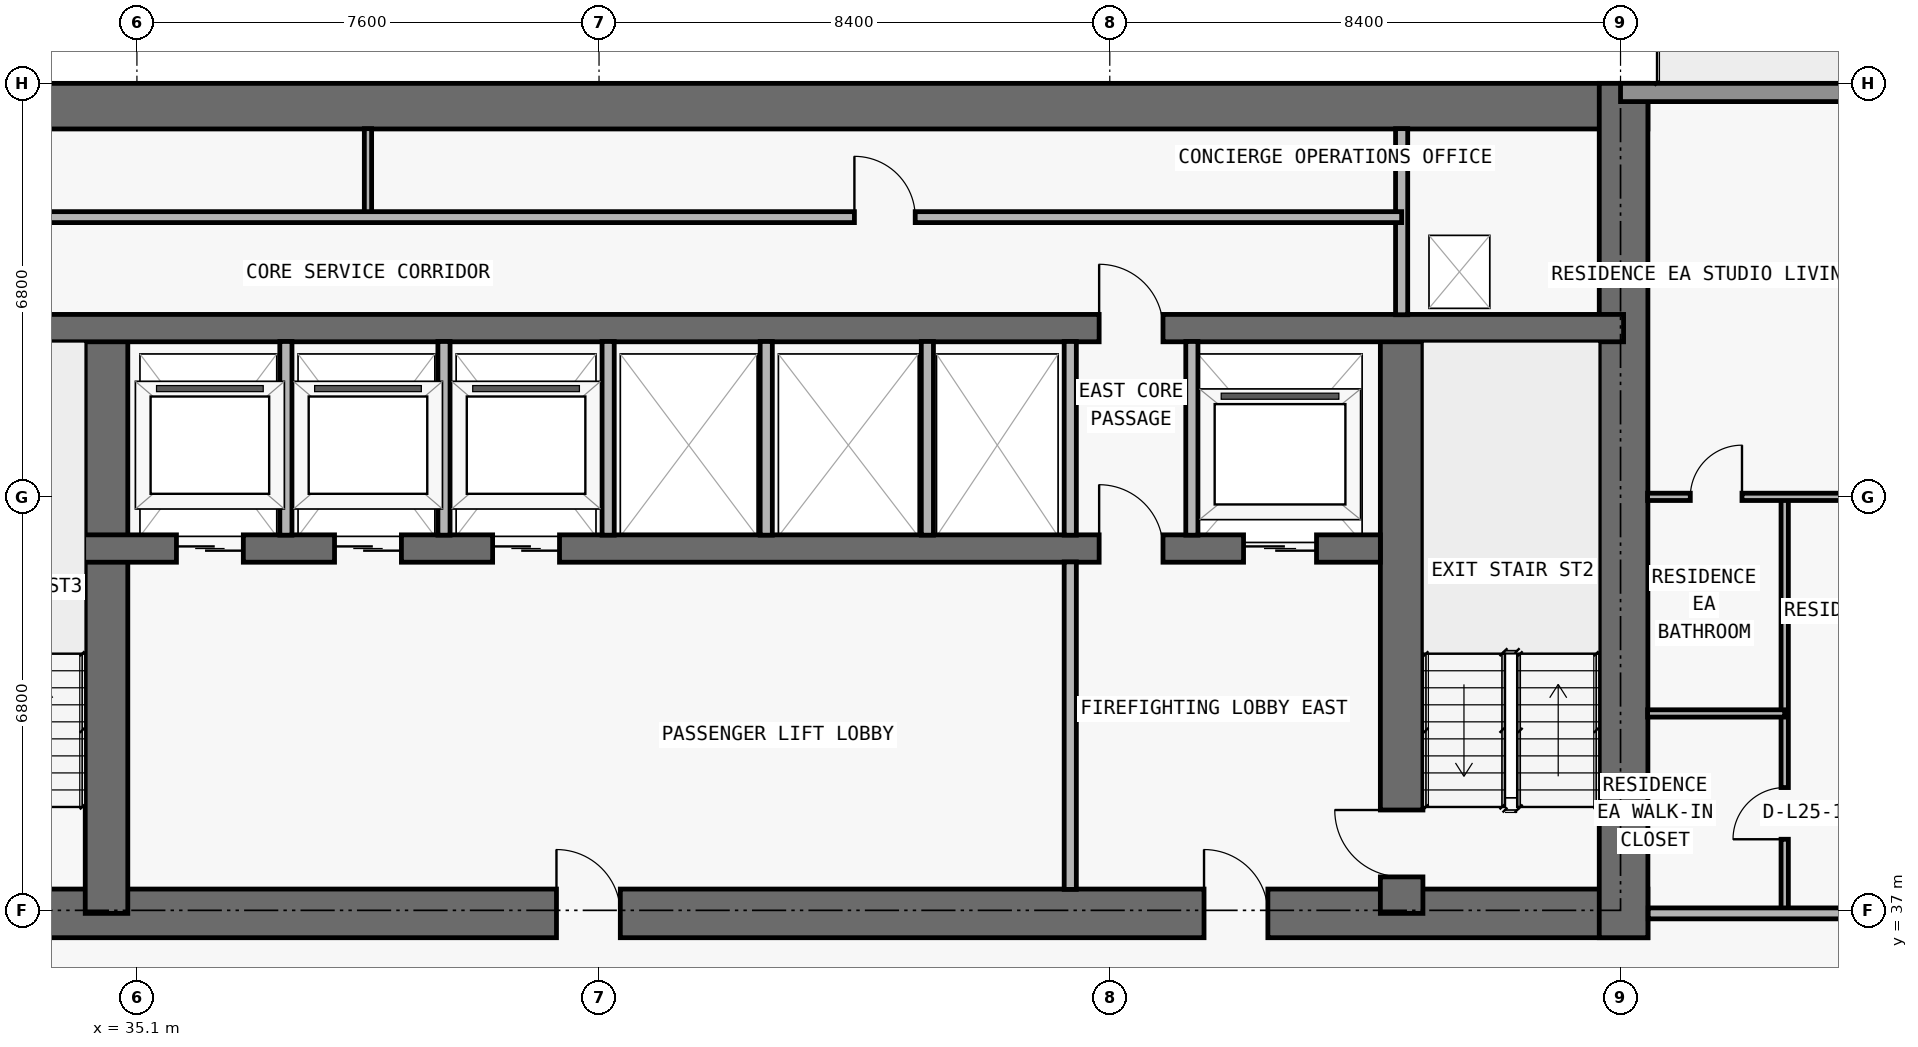
"""IFC4 building model, lengths in metres.
Left out: names, types, materials, properties, quantities, classifications, styles, units other than length and angle.
Written with IfcOpenShell. Run it as: python <this file> out.ifc"""

import sys

from ifc_helpers import new_model, si_unit, direction, frame, frame_2d, origin, place, context, subcontext, project, spatial, rectangle, extrude, element, fill, save


model = new_model("IFC4")
c1 = context("Model", 3, precision=1e-05, world=origin(), true_north=direction((0.0, 1.0)))
c2 = subcontext(c1, "Body", "Model", "MODEL_VIEW")
j1 = project(units=[si_unit("LENGTHUNIT", "METRE"), si_unit("PLANEANGLEUNIT", "RADIAN")], contexts=[c1])
p1 = place(None, origin())
s1 = spatial("IfcSite", under=j1, at=p1, CompositionType="ELEMENT")
p2 = place(p1, origin())
s2 = spatial("IfcBuilding", under=s1, at=p2, CompositionType="ELEMENT")
p3 = place(p2, frame((0.0, 0.0, 94.5)))
s3 = spatial("IfcBuildingStorey", under=s2, at=p3, CompositionType="ELEMENT", Elevation=94.5)
p4 = place(p3, frame((17.85, 36.95, 0.0), z_axis=(0.0, 0.0, 1.0), x_axis=(1.0, 0.0, 0.0)))
e1 = element("IfcWall", 1, at=p4, inside=s3, PredefinedType="SHEAR", context=c2, shape_type="SweptSolid", body=[
    extrude(rectangle(XDim=42.1, YDim=0.8, at=frame_2d((21.05, 0.0))), origin(), (0.0, 0.0, 1.0), 3.0),
])
p5 = place(p4, frame((14.45, 0.0, 0.0)))
e2 = element("IfcOpeningElement", 2, at=p5, cuts=e1, PredefinedType="OPENING", context=c2, shape_type="SweptSolid", body=[
    extrude(rectangle(XDim=1.1, YDim=2.15, at=frame_2d((0.55, 1.075))), frame((0.0, 0.41, 0.0), z_axis=(0.0, -1.0, 0.0), x_axis=(1.0, 0.0, 0.0)), (0.0, 0.0, 1.0), 0.82),
])
p6 = place(p4, frame((6.3, 0.0, 0.0)))
e3 = element("IfcOpeningElement", 3, at=p6, cuts=e1, PredefinedType="OPENING", context=c2, shape_type="SweptSolid", body=[
    extrude(rectangle(XDim=1.05, YDim=2.15, at=frame_2d((0.525, 1.075))), frame((0.0, 0.41, 0.0), z_axis=(0.0, -1.0, 0.0), x_axis=(1.0, 0.0, 0.0)), (0.0, 0.0, 1.0), 0.82),
])
p7 = place(p4, frame((34.8, 0.0, 0.0)))
e4 = element("IfcOpeningElement", 4, at=p7, cuts=e1, PredefinedType="OPENING", context=c2, shape_type="SweptSolid", body=[
    extrude(rectangle(XDim=1.05, YDim=2.15, at=frame_2d((0.525, 1.075))), frame((0.0, 0.41, 0.0), z_axis=(0.0, -1.0, 0.0), x_axis=(1.0, 0.0, 0.0)), (0.0, 0.0, 1.0), 0.82),
])
p8 = place(p4, frame((10.913, 0.0, 0.0)))
e5 = element("IfcOpeningElement", 5, at=p8, cuts=e1, PredefinedType="OPENING", context=c2, shape_type="SweptSolid", body=[
    extrude(rectangle(XDim=1.05, YDim=2.15, at=frame_2d((0.525, 1.075))), frame((0.0, 0.41, 0.0), z_axis=(0.0, -1.0, 0.0), x_axis=(1.0, 0.0, 0.0)), (0.0, 0.0, 1.0), 0.82),
])
p9 = place(p4, frame((24.15, 0.0, 0.0)))
e6 = element("IfcOpeningElement", 6, at=p9, cuts=e1, PredefinedType="OPENING", context=c2, shape_type="SweptSolid", body=[
    extrude(rectangle(XDim=1.05, YDim=2.15, at=frame_2d((0.525, 1.075))), frame((0.0, 0.41, 0.0), z_axis=(0.0, -1.0, 0.0), x_axis=(1.0, 0.0, 0.0)), (0.0, 0.0, 1.0), 0.82),
])
p10 = place(p3, frame((17.85, 50.225, 0.0), z_axis=(0.0, 0.0, 1.0), x_axis=(1.0, 0.0, 0.0)))
e7 = element("IfcWall", 7, at=p10, inside=s3, PredefinedType="SHEAR", context=c2, shape_type="SweptSolid", body=[
    extrude(rectangle(XDim=42.1, YDim=0.75, at=frame_2d((21.05, 0.0))), origin(), (0.0, 0.0, 1.0), 3.0),
])
p11 = place(p3, frame((59.55, 36.55, 0.0), z_axis=(0.0, 0.0, 1.0), x_axis=(0.0, 1.0, 0.0)))
e8 = element("IfcWall", 8, at=p11, inside=s3, PredefinedType="SHEAR", context=c2, shape_type="SweptSolid", body=[
    extrude(rectangle(XDim=14.05, YDim=0.8, at=frame_2d((7.025, 0.0))), origin(), (0.0, 0.0, 1.0), 3.0),
])
p12 = place(p3, frame((55.9, 36.95, 0.0), z_axis=(0.0, 0.0, 1.0), x_axis=(0.0, 1.0, 0.0)))
e9 = element("IfcWall", 9, at=p12, inside=s3, PredefinedType="SHEAR", context=c2, shape_type="SweptSolid", body=[
    extrude(rectangle(XDim=9.625, YDim=0.7, at=frame_2d((4.812, 0.0))), origin(), (0.0, 0.0, 1.0), 3.0),
])
p13 = place(p12, frame((0.6, 0.0, 0.0)))
e10 = element("IfcOpeningElement", 10, at=p13, cuts=e9, PredefinedType="OPENING", context=c2, shape_type="SweptSolid", body=[
    extrude(rectangle(XDim=1.1, YDim=2.15, at=frame_2d((0.55, 1.075))), frame((0.0, 0.36, 0.0), z_axis=(0.0, -1.0, 0.0), x_axis=(1.0, 0.0, 0.0)), (0.0, 0.0, 1.0), 0.72),
])
p14 = place(p3, frame((34.6, 36.95, 0.0), z_axis=(0.0, 0.0, 1.0), x_axis=(0.0, 1.0, 0.0)))
e11 = element("IfcWall", 11, at=p14, inside=s3, PredefinedType="SHEAR", context=c2, shape_type="SweptSolid", body=[
    extrude(rectangle(XDim=9.625, YDim=0.7, at=frame_2d((4.812, 0.0))), origin(), (0.0, 0.0, 1.0), 3.0),
])
p15 = place(p3, frame((22.25, 42.95, 0.0), z_axis=(0.0, 0.0, 1.0), x_axis=(1.0, 0.0, 0.0)))
e12 = element("IfcWall", 12, at=p15, inside=s3, PredefinedType="SHEAR", context=c2, shape_type="SweptSolid", body=[
    extrude(rectangle(XDim=33.3, YDim=0.45, at=frame_2d((16.65, 0.0))), origin(), (0.0, 0.0, 1.0), 3.0),
])
p16 = place(p15, frame((1.05, 0.0, 0.0)))
e13 = element("IfcOpeningElement", 13, at=p16, cuts=e12, PredefinedType="OPENING", context=c2, shape_type="SweptSolid", body=[
    extrude(rectangle(XDim=1.2, YDim=2.2, at=frame_2d((0.6, 1.1))), frame((0.0, 0.235, 0.0), z_axis=(0.0, -1.0, 0.0), x_axis=(1.0, 0.0, 0.0)), (0.0, 0.0, 1.0), 0.47),
])
p17 = place(p15, frame((31.05, 0.0, 0.0)))
e14 = element("IfcOpeningElement", 14, at=p17, cuts=e12, PredefinedType="OPENING", context=c2, shape_type="SweptSolid", body=[
    extrude(rectangle(XDim=1.2, YDim=2.2, at=frame_2d((0.6, 1.1))), frame((0.0, 0.235, 0.0), z_axis=(0.0, -1.0, 0.0), x_axis=(1.0, 0.0, 0.0)), (0.0, 0.0, 1.0), 0.47),
])
p18 = place(p15, frame((13.5, 0.0, 0.0)))
e15 = element("IfcOpeningElement", 15, at=p18, cuts=e12, PredefinedType="OPENING", context=c2, shape_type="SweptSolid", body=[
    extrude(rectangle(XDim=1.1, YDim=2.2, at=frame_2d((0.55, 1.1))), frame((0.0, 0.235, 0.0), z_axis=(0.0, -1.0, 0.0), x_axis=(1.0, 0.0, 0.0)), (0.0, 0.0, 1.0), 0.47),
])
p19 = place(p15, frame((16.1, 0.0, 0.0)))
e16 = element("IfcOpeningElement", 16, at=p19, cuts=e12, PredefinedType="OPENING", context=c2, shape_type="SweptSolid", body=[
    extrude(rectangle(XDim=1.1, YDim=2.2, at=frame_2d((0.55, 1.1))), frame((0.0, 0.235, 0.0), z_axis=(0.0, -1.0, 0.0), x_axis=(1.0, 0.0, 0.0)), (0.0, 0.0, 1.0), 0.47),
])
p20 = place(p15, frame((18.7, 0.0, 0.0)))
e17 = element("IfcOpeningElement", 17, at=p20, cuts=e12, PredefinedType="OPENING", context=c2, shape_type="SweptSolid", body=[
    extrude(rectangle(XDim=1.1, YDim=2.2, at=frame_2d((0.55, 1.1))), frame((0.0, 0.235, 0.0), z_axis=(0.0, -1.0, 0.0), x_axis=(1.0, 0.0, 0.0)), (0.0, 0.0, 1.0), 0.47),
])
p21 = place(p15, frame((3.625, 0.0, 0.0)))
e18 = element("IfcOpeningElement", 18, at=p21, cuts=e12, PredefinedType="OPENING", context=c2, shape_type="SweptSolid", body=[
    extrude(rectangle(XDim=1.05, YDim=2.15, at=frame_2d((0.525, 1.075))), frame((0.0, 0.235, 0.0), z_axis=(0.0, -1.0, 0.0), x_axis=(1.0, 0.0, 0.0)), (0.0, 0.0, 1.0), 0.47),
])
p22 = place(p15, frame((28.675, 0.0, 0.0)))
e19 = element("IfcOpeningElement", 19, at=p22, cuts=e12, PredefinedType="OPENING", context=c2, shape_type="SweptSolid", body=[
    extrude(rectangle(XDim=1.05, YDim=2.15, at=frame_2d((0.525, 1.075))), frame((0.0, 0.235, 0.0), z_axis=(0.0, -1.0, 0.0), x_axis=(1.0, 0.0, 0.0)), (0.0, 0.0, 1.0), 0.47),
])
p23 = place(p3, frame((18.25, 46.575, 0.0), z_axis=(0.0, 0.0, 1.0), x_axis=(1.0, 0.0, 0.0)))
e20 = element("IfcWall", 20, at=p23, inside=s3, PredefinedType="SHEAR", context=c2, shape_type="SweptSolid", body=[
    extrude(rectangle(XDim=41.3, YDim=0.45, at=frame_2d((20.65, 0.0))), origin(), (0.0, 0.0, 1.0), 3.0),
])
p24 = place(p23, frame((7.625, 0.0, 0.0)))
e21 = element("IfcOpeningElement", 21, at=p24, cuts=e20, PredefinedType="OPENING", context=c2, shape_type="SweptSolid", body=[
    extrude(rectangle(XDim=1.05, YDim=2.15, at=frame_2d((0.525, 1.075))), frame((0.0, 0.235, 0.0), z_axis=(0.0, -1.0, 0.0), x_axis=(1.0, 0.0, 0.0)), (0.0, 0.0, 1.0), 0.47),
])
p25 = place(p23, frame((32.675, 0.0, 0.0)))
e22 = element("IfcOpeningElement", 22, at=p25, cuts=e20, PredefinedType="OPENING", context=c2, shape_type="SweptSolid", body=[
    extrude(rectangle(XDim=1.05, YDim=2.15, at=frame_2d((0.525, 1.075))), frame((0.0, 0.235, 0.0), z_axis=(0.0, -1.0, 0.0), x_axis=(1.0, 0.0, 0.0)), (0.0, 0.0, 1.0), 0.47),
])
p26 = place(p3, frame((59.5, 50.45, 0.0), z_axis=(0.0, 0.0, 1.0), x_axis=(1.0, 0.0, 0.0)))
e23 = element("IfcWall", 23, at=p26, inside=s3, PredefinedType="STANDARD", context=c2, shape_type="SweptSolid", body=[
    extrude(rectangle(XDim=10.6, YDim=0.3, at=frame_2d((5.3, 0.0))), origin(), (0.0, 0.0, 1.0), 3.0),
])
p27 = place(p26, frame((4.3, 0.0, 0.0)))
e24 = element("IfcOpeningElement", 24, at=p27, cuts=e23, PredefinedType="OPENING", context=c2, shape_type="SweptSolid", body=[
    extrude(rectangle(XDim=2.0, YDim=2.3, at=frame_2d((1.0, 1.15))), frame((0.0, 0.16, 0.0), z_axis=(0.0, -1.0, 0.0), x_axis=(1.0, 0.0, 0.0)), (0.0, 0.0, 1.0), 0.32),
])
p28 = place(p3, frame((37.55, 43.17, 0.0), z_axis=(0.0, 0.0, 1.0), x_axis=(0.0, 1.0, 0.0)))
e25 = element("IfcWall", 25, at=p28, inside=s3, PredefinedType="PARTITIONING", context=c2, shape_type="SweptSolid", body=[
    extrude(rectangle(XDim=3.185, YDim=0.2, at=frame_2d((1.593, 0.0))), origin(), (0.0, 0.0, 1.0), 3.0),
])
p29 = place(p3, frame((38.9, 48.4, 0.0), z_axis=(0.0, 0.0, 1.0), x_axis=(0.0, 1.0, 0.0)))
e26 = element("IfcWall", 26, at=p29, inside=s3, PredefinedType="PARTITIONING", context=c2, shape_type="SweptSolid", body=[
    extrude(rectangle(XDim=1.455, YDim=0.12, at=frame_2d((0.728, 0.0))), origin(), (0.0, 0.0, 1.0), 3.0),
])
for number, where, z_axis, x_axis in (
    (27, (40.15, 43.17, 0.0), (0.0, 0.0, 1.0), (0.0, 1.0, 0.0)),
    (28, (42.85, 43.17, 0.0), (0.0, 0.0, 1.0), (0.0, 1.0, 0.0)),
    (29, (45.45, 43.17, 0.0), (0.0, 0.0, 1.0), (0.0, 1.0, 0.0)),
    (30, (48.1, 43.17, 0.0), (0.0, 0.0, 1.0), (0.0, 1.0, 0.0)),
):
    element("IfcWall", number, at=place(p3, frame(where, z_axis=z_axis, x_axis=x_axis)), inside=s3, PredefinedType="PARTITIONING", context=c2, shape_type="SweptSolid", body=[
        extrude(rectangle(XDim=3.185, YDim=0.2, at=frame_2d((1.593, 0.0))), origin(), (0.0, 0.0, 1.0), 3.0),
    ])
p30 = place(p3, frame((50.45, 37.345, 0.0), z_axis=(0.0, 0.0, 1.0), x_axis=(0.0, 1.0, 0.0)))
e31 = element("IfcWall", 31, at=p30, inside=s3, PredefinedType="PARTITIONING", context=c2, shape_type="SweptSolid", body=[
    extrude(rectangle(XDim=5.385, YDim=0.2, at=frame_2d((2.692, 0.0))), origin(), (0.0, 0.0, 1.0), 3.0),
])
for number, where, z_axis, x_axis in (
    (32, (50.45, 43.17, 0.0), (0.0, 0.0, 1.0), (0.0, 1.0, 0.0)),
    (33, (52.45, 43.17, 0.0), (0.0, 0.0, 1.0), (0.0, 1.0, 0.0)),
):
    element("IfcWall", number, at=place(p3, frame(where, z_axis=z_axis, x_axis=x_axis)), inside=s3, PredefinedType="PARTITIONING", context=c2, shape_type="SweptSolid", body=[
        extrude(rectangle(XDim=3.185, YDim=0.2, at=frame_2d((1.593, 0.0))), origin(), (0.0, 0.0, 1.0), 3.0),
    ])
p31 = place(p3, frame((55.9, 46.795, 0.0), z_axis=(0.0, 0.0, 1.0), x_axis=(0.0, 1.0, 0.0)))
e34 = element("IfcWall", 34, at=p31, inside=s3, PredefinedType="PARTITIONING", context=c2, shape_type="SweptSolid", body=[
    extrude(rectangle(XDim=3.06, YDim=0.2, at=frame_2d((1.53, 0.0))), origin(), (0.0, 0.0, 1.0), 3.0),
])
p32 = place(p3, frame((62.2, 36.95, 0.0), z_axis=(0.0, 0.0, 1.0), x_axis=(0.0, 1.0, 0.0)))
e35 = element("IfcWall", 35, at=p32, inside=s3, PredefinedType="PARTITIONING", context=c2, shape_type="SweptSolid", body=[
    extrude(rectangle(XDim=6.85, YDim=0.12, at=frame_2d((3.425, 0.0))), origin(), (0.0, 0.0, 1.0), 3.0),
])
p33 = place(p32, frame((1.219, 0.0, 0.0)))
e36 = element("IfcOpeningElement", 36, at=p33, cuts=e35, PredefinedType="OPENING", context=c2, shape_type="SweptSolid", body=[
    extrude(rectangle(XDim=0.85, YDim=2.1, at=frame_2d((0.425, 1.05))), frame((0.0, 0.07, 0.0), z_axis=(0.0, -1.0, 0.0), x_axis=(1.0, 0.0, 0.0)), (0.0, 0.0, 1.0), 0.14),
])
p34 = place(p3, frame((59.955, 36.95, 0.0), z_axis=(0.0, 0.0, 1.0), x_axis=(1.0, 0.0, 0.0)))
e37 = element("IfcWall", 37, at=p34, inside=s3, PredefinedType="PARTITIONING", context=c2, shape_type="SweptSolid", body=[
    extrude(rectangle(XDim=10.145, YDim=0.18, at=frame_2d((5.073, 0.0))), origin(), (0.0, 0.0, 1.0), 3.0),
])
p35 = place(p34, frame((3.957, 0.0, 0.0)))
e38 = element("IfcOpeningElement", 38, at=p35, cuts=e37, PredefinedType="OPENING", context=c2, shape_type="SweptSolid", body=[
    extrude(rectangle(XDim=1.0, YDim=2.2, at=frame_2d((0.5, 1.1))), frame((0.0, 0.1, 0.0), z_axis=(0.0, -1.0, 0.0), x_axis=(1.0, 0.0, 0.0)), (0.0, 0.0, 1.0), 0.2),
])
p36 = place(p3, frame((59.945, 40.238, 0.0), z_axis=(0.0, 0.0, 1.0), x_axis=(1.0, 0.0, 0.0)))
e39 = element("IfcWall", 39, at=p36, inside=s3, PredefinedType="PARTITIONING", context=c2, shape_type="SweptSolid", body=[
    extrude(rectangle(XDim=2.255, YDim=0.12, at=frame_2d((1.127, 0.0))), origin(), (0.0, 0.0, 1.0), 3.0),
])
p37 = place(p3, frame((59.945, 43.8, 0.0), z_axis=(0.0, 0.0, 1.0), x_axis=(1.0, 0.0, 0.0)))
e40 = element("IfcWall", 40, at=p37, inside=s3, PredefinedType="PARTITIONING", context=c2, shape_type="SweptSolid", body=[
    extrude(rectangle(XDim=13.66, YDim=0.12, at=frame_2d((6.83, 0.0))), origin(), (0.0, 0.0, 1.0), 2.289),
])
p38 = place(p37, frame((4.017, 0.0, 0.0)))
e41 = element("IfcOpeningElement", 41, at=p38, cuts=e40, PredefinedType="OPENING", context=c2, shape_type="SweptSolid", body=[
    extrude(rectangle(XDim=0.9, YDim=2.15, at=frame_2d((0.45, 1.075))), frame((0.0, 0.07, 0.0), z_axis=(0.0, -1.0, 0.0), x_axis=(1.0, 0.0, 0.0)), (0.0, 0.0, 1.0), 0.14),
])
p39 = place(p37, frame((0.702, 0.0, 0.0)))
e42 = element("IfcOpeningElement", 42, at=p39, cuts=e40, PredefinedType="OPENING", context=c2, shape_type="SweptSolid", body=[
    extrude(rectangle(XDim=0.85, YDim=2.1, at=frame_2d((0.425, 1.05))), frame((0.0, 0.07, 0.0), z_axis=(0.0, -1.0, 0.0), x_axis=(1.0, 0.0, 0.0)), (0.0, 0.0, 1.0), 0.14),
])
p40 = place(p3, frame((21.9, 48.4, 0.0), z_axis=(0.0, 0.0, 1.0), x_axis=(1.0, 0.0, 0.0)))
e43 = element("IfcWall", 43, at=p40, inside=s3, PredefinedType="PARTITIONING", context=c2, shape_type="SweptSolid", body=[
    extrude(rectangle(XDim=34.0, YDim=0.18, at=frame_2d((17.0, 0.0))), origin(), (0.0, 0.0, 1.0), 3.0),
])
p41 = place(p40, frame((8.0, 0.0, 0.0)))
e44 = element("IfcOpeningElement", 44, at=p41, cuts=e43, PredefinedType="OPENING", context=c2, shape_type="SweptSolid", body=[
    extrude(rectangle(XDim=1.0, YDim=2.2, at=frame_2d((0.5, 1.1))), frame((0.0, 0.1, 0.0), z_axis=(0.0, -1.0, 0.0), x_axis=(1.0, 0.0, 0.0)), (0.0, 0.0, 1.0), 0.2),
])
p42 = place(p40, frame((25.0, 0.0, 0.0)))
e45 = element("IfcOpeningElement", 45, at=p42, cuts=e43, PredefinedType="OPENING", context=c2, shape_type="SweptSolid", body=[
    extrude(rectangle(XDim=1.0, YDim=2.2, at=frame_2d((0.5, 1.1))), frame((0.0, 0.1, 0.0), z_axis=(0.0, -1.0, 0.0), x_axis=(1.0, 0.0, 0.0)), (0.0, 0.0, 1.0), 0.2),
])
p43 = place(p17, origin())
e46 = element("IfcDoor", 46, at=p43, inside=s3, OperationType="DOUBLE_DOOR_SLIDING", PredefinedType="DOOR", context=c2, shape_type="SweptSolid", body=[
    extrude(rectangle(XDim=1.2, YDim=2.2, at=frame_2d((0.6, 1.1))), frame((0.0, 0.025, 0.0), z_axis=(0.0, -1.0, 0.0), x_axis=(1.0, 0.0, 0.0)), (0.0, 0.0, 1.0), 0.05),
])
fill(e14, e46)
p44 = place(p18, origin())
e47 = element("IfcDoor", 47, at=p44, inside=s3, OperationType="DOUBLE_DOOR_SLIDING", PredefinedType="DOOR", context=c2, shape_type="SweptSolid", body=[
    extrude(rectangle(XDim=1.1, YDim=2.2, at=frame_2d((0.55, 1.1))), frame((0.0, 0.025, 0.0), z_axis=(0.0, -1.0, 0.0), x_axis=(1.0, 0.0, 0.0)), (0.0, 0.0, 1.0), 0.05),
])
fill(e15, e47)
p45 = place(p19, origin())
e48 = element("IfcDoor", 48, at=p45, inside=s3, OperationType="DOUBLE_DOOR_SLIDING", PredefinedType="DOOR", context=c2, shape_type="SweptSolid", body=[
    extrude(rectangle(XDim=1.1, YDim=2.2, at=frame_2d((0.55, 1.1))), frame((0.0, 0.025, 0.0), z_axis=(0.0, -1.0, 0.0), x_axis=(1.0, 0.0, 0.0)), (0.0, 0.0, 1.0), 0.05),
])
fill(e16, e48)
p46 = place(p20, origin())
e49 = element("IfcDoor", 49, at=p46, inside=s3, OperationType="DOUBLE_DOOR_SLIDING", PredefinedType="DOOR", context=c2, shape_type="SweptSolid", body=[
    extrude(rectangle(XDim=1.1, YDim=2.2, at=frame_2d((0.55, 1.1))), frame((0.0, 0.025, 0.0), z_axis=(0.0, -1.0, 0.0), x_axis=(1.0, 0.0, 0.0)), (0.0, 0.0, 1.0), 0.05),
])
fill(e17, e49)
p47 = place(p7, origin())
e50 = element("IfcDoor", 50, at=p47, inside=s3, OperationType="SINGLE_SWING_LEFT", PredefinedType="DOOR", context=c2, shape_type="SweptSolid", body=[
    extrude(rectangle(XDim=1.05, YDim=2.15, at=frame_2d((0.525, 1.075))), frame((0.0, 0.025, 0.0), z_axis=(0.0, -1.0, 0.0), x_axis=(1.0, 0.0, 0.0)), (0.0, 0.0, 1.0), 0.05),
])
fill(e4, e50)
p48 = place(p13, origin())
e51 = element("IfcDoor", 51, at=p48, inside=s3, OperationType="SINGLE_SWING_RIGHT", PredefinedType="DOOR", context=c2, shape_type="SweptSolid", body=[
    extrude(rectangle(XDim=1.1, YDim=2.15, at=frame_2d((0.55, 1.075))), frame((0.0, 0.025, 0.0), z_axis=(0.0, -1.0, 0.0), x_axis=(1.0, 0.0, 0.0)), (0.0, 0.0, 1.0), 0.05),
])
fill(e10, e51)
p49 = place(p22, origin())
e52 = element("IfcDoor", 52, at=p49, inside=s3, OperationType="SINGLE_SWING_LEFT", PredefinedType="DOOR", context=c2, shape_type="SweptSolid", body=[
    extrude(rectangle(XDim=1.05, YDim=2.15, at=frame_2d((0.525, 1.075))), frame((0.0, 0.025, 0.0), z_axis=(0.0, -1.0, 0.0), x_axis=(1.0, 0.0, 0.0)), (0.0, 0.0, 1.0), 0.05),
])
fill(e19, e52)
p50 = place(p9, origin())
e53 = element("IfcDoor", 53, at=p50, inside=s3, OperationType="SINGLE_SWING_LEFT", PredefinedType="DOOR", context=c2, shape_type="SweptSolid", body=[
    extrude(rectangle(XDim=1.05, YDim=2.15, at=frame_2d((0.525, 1.075))), frame((0.0, 0.025, 0.0), z_axis=(0.0, -1.0, 0.0), x_axis=(1.0, 0.0, 0.0)), (0.0, 0.0, 1.0), 0.05),
])
fill(e6, e53)
p51 = place(p25, origin())
e54 = element("IfcDoor", 54, at=p51, inside=s3, OperationType="SINGLE_SWING_LEFT", PredefinedType="DOOR", context=c2, shape_type="SweptSolid", body=[
    extrude(rectangle(XDim=1.05, YDim=2.15, at=frame_2d((0.525, 1.075))), frame((0.0, 0.025, 0.0), z_axis=(0.0, -1.0, 0.0), x_axis=(1.0, 0.0, 0.0)), (0.0, 0.0, 1.0), 0.05),
])
fill(e22, e54)
p52 = place(p42, origin())
e55 = element("IfcDoor", 55, at=p52, inside=s3, OperationType="SINGLE_SWING_LEFT", PredefinedType="DOOR", context=c2, shape_type="SweptSolid", body=[
    extrude(rectangle(XDim=1.0, YDim=2.2, at=frame_2d((0.5, 1.1))), frame((0.0, 0.025, 0.0), z_axis=(0.0, -1.0, 0.0), x_axis=(1.0, 0.0, 0.0)), (0.0, 0.0, 1.0), 0.05),
])
fill(e45, e55)
p53 = place(p33, origin())
e56 = element("IfcDoor", 56, at=p53, inside=s3, OperationType="SINGLE_SWING_LEFT", PredefinedType="DOOR", context=c2, shape_type="SweptSolid", body=[
    extrude(rectangle(XDim=0.85, YDim=2.1, at=frame_2d((0.425, 1.05))), frame((0.0, 0.025, 0.0), z_axis=(0.0, -1.0, 0.0), x_axis=(1.0, 0.0, 0.0)), (0.0, 0.0, 1.0), 0.05),
])
fill(e36, e56)
p54 = place(p39, origin())
e57 = element("IfcDoor", 57, at=p54, inside=s3, OperationType="SINGLE_SWING_RIGHT", PredefinedType="DOOR", context=c2, shape_type="SweptSolid", body=[
    extrude(rectangle(XDim=0.85, YDim=2.1, at=frame_2d((0.425, 1.05))), frame((0.0, 0.025, 0.0), z_axis=(0.0, -1.0, 0.0), x_axis=(1.0, 0.0, 0.0)), (0.0, 0.0, 1.0), 0.05),
])
fill(e42, e57)
save(model, sys.argv[1])
